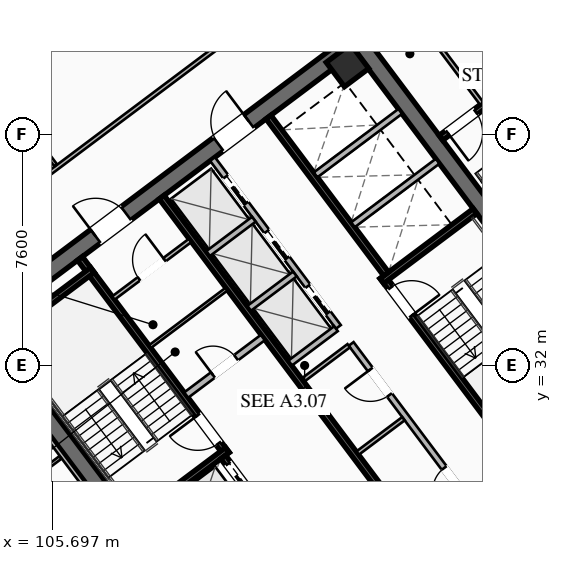
"""IFC4 building model, lengths in metres.
Left out: names, types, materials, properties, quantities, classifications, styles, units other than length and angle.
Written with IfcOpenShell. Run it as: python <this file> out.ifc"""

import sys

from ifc_helpers import new_model, si_unit, direction, frame, frame_2d, origin, origin_2d, place, context, subcontext, project, spatial, rectangle, hollow_rectangle, extrude, element, fill, save


model = new_model("IFC4")
c1 = context("Model", 3, precision=1e-05, world=origin(), true_north=direction((0.0, 1.0)))
c2 = subcontext(c1, "Body", "Model", "MODEL_VIEW")
j1 = project(units=[si_unit("LENGTHUNIT", "METRE"), si_unit("PLANEANGLEUNIT", "RADIAN")], contexts=[c1])
p1 = place(None, origin())
s1 = spatial("IfcSite", under=j1, at=p1, CompositionType="ELEMENT")
p2 = place(p1, origin())
s2 = spatial("IfcBuilding", under=s1, at=p2, CompositionType="ELEMENT")
p3 = place(p2, frame((0.0, 0.0, 128.6)))
s3 = spatial("IfcBuildingStorey", under=s2, at=p3, CompositionType="ELEMENT", Elevation=128.6)
for number, where, z_axis, x_axis in (
    (1, (112.436, 21.077, 0.0), (0.0, 0.0, 1.0), (-0.6, 0.8, 0.0)),
    (2, (115.564, 42.923, 0.0), (0.0, 0.0, 1.0), (0.6, -0.8, 0.0)),
):
    element("IfcWall", number, at=place(p3, frame(where, z_axis=z_axis, x_axis=x_axis)), inside=s3, PredefinedType="SHEAR", context=c2, shape_type="SweptSolid", body=[
        extrude(rectangle(XDim=15.6, YDim=0.55, at=frame_2d((7.8, 0.0))), origin(), (0.0, 0.0, 1.0), 3.55),
    ])
p4 = place(p3, frame((124.539, 30.498, 0.0), z_axis=(0.0, 0.0, 1.0), x_axis=(-0.799998054672, -0.600002593761, 0.0)))
e3 = element("IfcWall", 3, at=p4, inside=s3, PredefinedType="SHEAR", context=c2, shape_type="SweptSolid", body=[
    extrude(rectangle(XDim=15.06, YDim=0.55, at=frame_2d((7.53, 0.0))), origin(), (0.0, 0.0, 1.0), 3.55),
])
p5 = place(p4, frame((9.23, 0.0, 0.0)))
e4 = element("IfcOpeningElement", 4, at=p5, cuts=e3, PredefinedType="OPENING", context=c2, shape_type="SweptSolid", body=[
    extrude(rectangle(XDim=1.25, YDim=2.25, at=frame_2d((0.625, 1.125))), frame((0.0, 0.285, 0.0), z_axis=(0.0, -1.0, 0.0), x_axis=(1.0, 0.0, 0.0)), (0.0, 0.0, 1.0), 0.57),
])
p6 = place(p4, frame((4.18, 0.0, 0.0)))
e5 = element("IfcOpeningElement", 5, at=p6, cuts=e3, PredefinedType="OPENING", context=c2, shape_type="SweptSolid", body=[
    extrude(rectangle(XDim=1.25, YDim=2.25, at=frame_2d((0.625, 1.125))), frame((0.0, 0.285, 0.0), z_axis=(0.0, -1.0, 0.0), x_axis=(1.0, 0.0, 0.0)), (0.0, 0.0, 1.0), 0.57),
])
p7 = place(p3, frame((103.461, 33.502, 0.0), z_axis=(0.0, 0.0, 1.0), x_axis=(0.799998054672, 0.600002593761, 0.0)))
e6 = element("IfcWall", 6, at=p7, inside=s3, PredefinedType="SHEAR", context=c2, shape_type="SweptSolid", body=[
    extrude(rectangle(XDim=15.06, YDim=0.55, at=frame_2d((7.53, 0.0))), origin(), (0.0, 0.0, 1.0), 3.55),
])
p8 = place(p7, frame((4.58, 0.0, 0.0)))
e7 = element("IfcOpeningElement", 7, at=p8, cuts=e6, PredefinedType="OPENING", context=c2, shape_type="SweptSolid", body=[
    extrude(rectangle(XDim=1.25, YDim=2.25, at=frame_2d((0.625, 1.125))), frame((0.0, 0.285, 0.0), z_axis=(0.0, -1.0, 0.0), x_axis=(1.0, 0.0, 0.0)), (0.0, 0.0, 1.0), 0.57),
])
p9 = place(p7, frame((9.63, 0.0, 0.0)))
e8 = element("IfcOpeningElement", 8, at=p9, cuts=e6, PredefinedType="OPENING", context=c2, shape_type="SweptSolid", body=[
    extrude(rectangle(XDim=1.25, YDim=2.25, at=frame_2d((0.625, 1.125))), frame((0.0, 0.285, 0.0), z_axis=(0.0, -1.0, 0.0), x_axis=(1.0, 0.0, 0.0)), (0.0, 0.0, 1.0), 0.57),
])
p10 = place(p3, frame((115.41, 41.87, 0.0), z_axis=(0.0, 0.0, 1.0), x_axis=(0.799999996291, 0.600000004945, 0.0)))
e9 = element("IfcColumn", 9, at=p10, inside=s3, PredefinedType="COLUMN", context=c2, shape_type="SweptSolid", body=[
    extrude(hollow_rectangle(XDim=1.0, YDim=1.0, WallThickness=0.04, at=origin_2d()), origin(), (0.0, 0.0, 1.0), 3.37),
])
p11 = place(p3, frame((111.44, 29.08, 0.0), z_axis=(0.0, 0.0, 1.0), x_axis=(-0.59999029481, 0.8000072788, 0.0)))
e10 = element("IfcWall", 10, at=p11, inside=s3, PredefinedType="SHEAR", context=c2, shape_type="SweptSolid", body=[
    extrude(rectangle(XDim=8.05, YDim=0.2, at=frame_2d((4.025, 0.0))), origin(), (0.0, 0.0, 1.0), 3.37),
])
p12 = place(p11, frame((0.45, 0.0, 0.0)))
e11 = element("IfcOpeningElement", 11, at=p12, cuts=e10, PredefinedType="OPENING", context=c2, shape_type="SweptSolid", body=[
    extrude(rectangle(XDim=1.15, YDim=2.2, at=frame_2d((0.575, 1.1))), frame((0.0, 0.11, 0.0), z_axis=(0.0, -1.0, 0.0), x_axis=(1.0, 0.0, 0.0)), (0.0, 0.0, 1.0), 0.22),
])
for number, where, z_axis, x_axis in (
    (12, (108.396, 26.922, 0.0), (0.0, 0.0, 1.0), (0.8, 0.6, 0.0)),
    (13, (103.956, 32.842, 0.0), (0.0, 0.0, 1.0), (0.8, 0.6, 0.0)),
):
    element("IfcWall", number, at=place(p3, frame(where, z_axis=z_axis, x_axis=x_axis)), inside=s3, PredefinedType="SHEAR", context=c2, shape_type="SweptSolid", body=[
        extrude(rectangle(XDim=3.83, YDim=0.2, at=frame_2d((1.915, 0.0))), origin(), (0.0, 0.0, 1.0), 3.37),
    ])
p13 = place(p3, frame((116.56, 34.92, 0.0), z_axis=(0.0, 0.0, 1.0), x_axis=(0.59999029481, -0.8000072788, 0.0)))
e14 = element("IfcWall", 14, at=p13, inside=s3, PredefinedType="SHEAR", context=c2, shape_type="SweptSolid", body=[
    extrude(rectangle(XDim=8.05, YDim=0.2, at=frame_2d((4.025, 0.0))), origin(), (0.0, 0.0, 1.0), 3.37),
])
p14 = place(p13, frame((0.45, 0.0, 0.0)))
e15 = element("IfcOpeningElement", 15, at=p14, cuts=e14, PredefinedType="OPENING", context=c2, shape_type="SweptSolid", body=[
    extrude(rectangle(XDim=1.15, YDim=2.2, at=frame_2d((0.575, 1.1))), frame((0.0, 0.11, 0.0), z_axis=(0.0, -1.0, 0.0), x_axis=(1.0, 0.0, 0.0)), (0.0, 0.0, 1.0), 0.22),
])
p15 = place(p3, frame((116.54, 34.78, 0.0), z_axis=(0.0, 0.0, 1.0), x_axis=(0.800015298837, 0.599979601008, 0.0)))
e16 = element("IfcWall", 16, at=p15, inside=s3, PredefinedType="SHEAR", context=c2, shape_type="SweptSolid", body=[
    extrude(rectangle(XDim=3.83, YDim=0.2, at=frame_2d((1.915, 0.0))), origin(), (0.0, 0.0, 1.0), 3.37),
])
p16 = place(p3, frame((117.998, 25.936, 0.0), z_axis=(0.0, 0.0, 1.0), x_axis=(-0.600002693989, 0.799997979501, 0.0)))
e17 = element("IfcWall", 17, at=p16, inside=s3, PredefinedType="SHEAR", context=c2, shape_type="SweptSolid", body=[
    extrude(rectangle(XDim=14.5, YDim=0.2, at=frame_2d((7.25, 0.0))), origin(), (0.0, 0.0, 1.0), 3.37),
])
p17 = place(p3, frame((110.104, 31.028, 0.0), z_axis=(0.0, 0.0, 1.0), x_axis=(0.800018601094, 0.59997519774, 0.0)))
e18 = element("IfcWall", 18, at=p17, inside=s3, PredefinedType="SOLIDWALL", context=c2, shape_type="SweptSolid", body=[
    extrude(rectangle(XDim=3.15, YDim=0.22, at=frame_2d((1.575, 0.0))), origin(), (0.0, 0.0, 1.0), 2.723),
])
p18 = place(p17, frame((1.1, 0.0, 0.0)))
e19 = element("IfcOpeningElement", 19, at=p18, cuts=e18, PredefinedType="OPENING", context=c2, shape_type="SweptSolid", body=[
    extrude(rectangle(XDim=0.95, YDim=2.05, at=frame_2d((0.475, 1.025))), frame((0.0, 0.12, 0.0), z_axis=(0.0, -1.0, 0.0), x_axis=(1.0, 0.0, 0.0)), (0.0, 0.0, 1.0), 0.24),
])
p19 = place(p3, frame((115.19, 23.83, 0.0), z_axis=(0.0, 0.0, 1.0), x_axis=(-0.599993943644, 0.800004542231, 0.0)))
e20 = element("IfcWall", 20, at=p19, inside=s3, PredefinedType="SHEAR", context=c2, shape_type="SweptSolid", body=[
    extrude(rectangle(XDim=6.45, YDim=0.2, at=frame_2d((3.225, 0.0))), origin(), (0.0, 0.0, 1.0), 3.37),
])
p20 = place(p19, frame((4.875, 0.0, 0.0)))
e21 = element("IfcOpeningElement", 21, at=p20, cuts=e20, PredefinedType="OPENING", context=c2, shape_type="SweptSolid", body=[
    extrude(rectangle(XDim=1.3, YDim=2.25, at=frame_2d((0.65, 1.125))), frame((0.0, 0.11, 0.0), z_axis=(0.0, -1.0, 0.0), x_axis=(1.0, 0.0, 0.0)), (0.0, 0.0, 1.0), 0.22),
])
p21 = place(p19, frame((2.875, 0.0, 0.0)))
e22 = element("IfcOpeningElement", 22, at=p21, cuts=e20, PredefinedType="OPENING", context=c2, shape_type="SweptSolid", body=[
    extrude(rectangle(XDim=1.3, YDim=2.25, at=frame_2d((0.65, 1.125))), frame((0.0, 0.11, 0.0), z_axis=(0.0, -1.0, 0.0), x_axis=(1.0, 0.0, 0.0)), (0.0, 0.0, 1.0), 0.22),
])
p22 = place(p19, frame((0.675, 0.0, 0.0)))
e23 = element("IfcOpeningElement", 23, at=p22, cuts=e20, PredefinedType="OPENING", context=c2, shape_type="SweptSolid", body=[
    extrude(rectangle(XDim=1.3, YDim=2.25, at=frame_2d((0.65, 1.125))), frame((0.0, 0.11, 0.0), z_axis=(0.0, -1.0, 0.0), x_axis=(1.0, 0.0, 0.0)), (0.0, 0.0, 1.0), 0.22),
])
p23 = place(p3, frame((112.81, 40.17, 0.0), z_axis=(0.0, 0.0, 1.0), x_axis=(0.599993943644, -0.800004542231, 0.0)))
e24 = element("IfcWall", 24, at=p23, inside=s3, PredefinedType="SHEAR", context=c2, shape_type="SweptSolid", body=[
    extrude(rectangle(XDim=6.45, YDim=0.2, at=frame_2d((3.225, 0.0))), origin(), (0.0, 0.0, 1.0), 3.37),
])
for number, where, z_axis, x_axis in (
    (25, (115.59, 36.63, 0.0), (0.0, 0.0, 1.0), (0.8, 0.6, 0.0)),
    (26, (114.36, 38.27, 0.0), (0.0, 0.0, 1.0), (0.8, 0.6, 0.0)),
):
    element("IfcWall", number, at=place(p3, frame(where, z_axis=z_axis, x_axis=x_axis)), inside=s3, PredefinedType="SOLIDWALL", context=c2, shape_type="SweptSolid", body=[
        extrude(rectangle(XDim=3.48, YDim=0.2, at=frame_2d((1.74, 0.0))), origin(), (0.0, 0.0, 1.0), 3.37),
    ])
p24 = place(p3, frame((107.71, 34.22, 0.0), z_axis=(0.0, 0.0, 1.0), x_axis=(0.799981399002, 0.60002480053, 0.0)))
e27 = element("IfcWall", 27, at=p24, inside=s3, PredefinedType="PARTITIONING", context=c2, shape_type="SweptSolid", body=[
    extrude(rectangle(XDim=3.15, YDim=0.135, at=frame_2d((1.575, 0.0))), origin(), (0.0, 0.0, 1.0), 2.723),
])
p25 = place(p24, frame((1.05, 0.0, 0.0)))
e28 = element("IfcOpeningElement", 28, at=p25, cuts=e27, PredefinedType="OPENING", context=c2, shape_type="SweptSolid", body=[
    extrude(rectangle(XDim=1.05, YDim=2.2, at=frame_2d((0.525, 1.1))), frame((0.0, 0.077, 0.0), z_axis=(0.0, -1.0, 0.0), x_axis=(1.0, 0.0, 0.0)), (0.0, 0.0, 1.0), 0.155),
])
p26 = place(p3, frame((108.91, 32.62, 0.0), z_axis=(0.0, 0.0, 1.0), x_axis=(0.800018601094, 0.59997519774, 0.0)))
e29 = element("IfcWall", 29, at=p26, inside=s3, PredefinedType="PARTITIONING", context=c2, shape_type="SweptSolid", body=[
    extrude(rectangle(XDim=3.15, YDim=0.11, at=frame_2d((1.575, 0.0))), origin(), (0.0, 0.0, 1.0), 2.723),
])
p27 = place(p3, frame((119.67, 27.19, 0.0), z_axis=(0.0, 0.0, 1.0), x_axis=(-0.599988677396, 0.800008491828, 0.0)))
e30 = element("IfcWall", 30, at=p27, inside=s3, PredefinedType="SOLIDWALL", context=c2, shape_type="SweptSolid", body=[
    extrude(rectangle(XDim=6.9, YDim=0.2, at=frame_2d((3.45, 0.0))), origin(), (0.0, 0.0, 1.0), 2.723),
])
p28 = place(p27, frame((0.85, 0.0, 0.0)))
e31 = element("IfcOpeningElement", 31, at=p28, cuts=e30, PredefinedType="OPENING", context=c2, shape_type="SweptSolid", body=[
    extrude(rectangle(XDim=0.95, YDim=2.05, at=frame_2d((0.475, 1.025))), frame((0.0, 0.11, 0.0), z_axis=(0.0, -1.0, 0.0), x_axis=(1.0, 0.0, 0.0)), (0.0, 0.0, 1.0), 0.22),
])
p29 = place(p27, frame((4.8, 0.0, 0.0)))
e32 = element("IfcOpeningElement", 32, at=p29, cuts=e30, PredefinedType="OPENING", context=c2, shape_type="SweptSolid", body=[
    extrude(rectangle(XDim=1.05, YDim=2.2, at=frame_2d((0.525, 1.1))), frame((0.0, 0.11, 0.0), z_axis=(0.0, -1.0, 0.0), x_axis=(1.0, 0.0, 0.0)), (0.0, 0.0, 1.0), 0.22),
])
for number, where, z_axis, x_axis in (
    (33, (113.946, 31.522, 0.0), (0.0, 0.0, 1.0), (0.8, 0.6, 0.0)),
    (34, (115.746, 29.122, 0.0), (0.0, 0.0, 1.0), (0.8, 0.6, 0.0)),
):
    element("IfcWall", number, at=place(p3, frame(where, z_axis=z_axis, x_axis=x_axis)), inside=s3, PredefinedType="PARTITIONING", context=c2, shape_type="SweptSolid", body=[
        extrude(rectangle(XDim=1.88, YDim=0.135, at=frame_2d((0.94, 0.0))), origin(), (0.0, 0.0, 1.0), 2.723),
    ])
p30 = place(p3, frame((115.11, 33.27, 0.0), z_axis=(0.0, 0.0, 1.0), x_axis=(-0.600011322243, 0.799991508192, 0.0)))
e35 = element("IfcWall", 35, at=p30, inside=s3, PredefinedType="SOLIDWALL", context=c2, shape_type="SweptSolid", body=[
    extrude(rectangle(XDim=6.9, YDim=0.2, at=frame_2d((3.45, 0.0))), origin(), (0.0, 0.0, 1.0), 3.37),
])
p31 = place(p30, frame((0.575, 0.0, 0.0)))
e36 = element("IfcOpeningElement", 36, at=p31, cuts=e35, PredefinedType="OPENING", context=c2, shape_type="SweptSolid", body=[
    extrude(rectangle(XDim=1.1, YDim=2.2, at=frame_2d((0.55, 1.1))), frame((0.0, 0.11, 0.0), z_axis=(0.0, -1.0, 0.0), x_axis=(1.0, 0.0, 0.0)), (0.0, 0.0, 1.0), 0.22),
])
p32 = place(p30, frame((2.825, 0.0, 0.0)))
e37 = element("IfcOpeningElement", 37, at=p32, cuts=e35, PredefinedType="OPENING", context=c2, shape_type="SweptSolid", body=[
    extrude(rectangle(XDim=1.1, YDim=2.2, at=frame_2d((0.55, 1.1))), frame((0.0, 0.11, 0.0), z_axis=(0.0, -1.0, 0.0), x_axis=(1.0, 0.0, 0.0)), (0.0, 0.0, 1.0), 0.22),
])
p33 = place(p30, frame((5.075, 0.0, 0.0)))
e38 = element("IfcOpeningElement", 38, at=p33, cuts=e35, PredefinedType="OPENING", context=c2, shape_type="SweptSolid", body=[
    extrude(rectangle(XDim=1.1, YDim=2.2, at=frame_2d((0.55, 1.1))), frame((0.0, 0.11, 0.0), z_axis=(0.0, -1.0, 0.0), x_axis=(1.0, 0.0, 0.0)), (0.0, 0.0, 1.0), 0.22),
])
p34 = place(p3, frame((113.526, 32.082, 0.0), z_axis=(0.0, 0.0, 1.0), x_axis=(0.800046745961, 0.599937666993, 0.0)))
e39 = element("IfcWall", 39, at=p34, inside=s3, PredefinedType="SOLIDWALL", context=c2, shape_type="SweptSolid", body=[
    extrude(rectangle(XDim=1.88, YDim=0.2, at=frame_2d((0.94, 0.0))), origin(), (0.0, 0.0, 1.0), 3.37),
])
p35 = place(p3, frame((112.176, 33.882, 0.0), z_axis=(0.0, 0.0, 1.0), x_axis=(0.8, 0.6, 0.0)))
e40 = element("IfcWall", 40, at=p35, inside=s3, PredefinedType="SOLIDWALL", context=c2, shape_type="SweptSolid", body=[
    extrude(rectangle(XDim=1.88, YDim=0.2, at=frame_2d((0.94, 0.0))), origin(), (0.0, 0.0, 1.0), 3.37),
])
p36 = place(p3, frame((110.826, 35.682, 0.0), z_axis=(0.0, 0.0, 1.0), x_axis=(0.799984418148, 0.600020775241, 0.0)))
e41 = element("IfcWall", 41, at=p36, inside=s3, PredefinedType="SOLIDWALL", context=c2, shape_type="SweptSolid", body=[
    extrude(rectangle(XDim=1.88, YDim=0.2, at=frame_2d((0.94, 0.0))), origin(), (0.0, 0.0, 1.0), 3.37),
])
p37 = place(p3, frame((121.204, 41.528, 0.0), z_axis=(0.0, 0.0, 1.0), x_axis=(-0.800017232136, -0.599977023131, 0.0)))
e42 = element("IfcWall", 42, at=p37, inside=s3, PredefinedType="SHEAR", context=c2, shape_type="SweptSolid", body=[
    extrude(rectangle(XDim=3.4, YDim=0.2, at=frame_2d((1.7, 0.0))), origin(), (0.0, 0.0, 1.0), 3.37),
])
p38 = place(p37, frame((1.975, 0.0, 0.0)))
e43 = element("IfcOpeningElement", 43, at=p38, cuts=e42, PredefinedType="OPENING", context=c2, shape_type="SweptSolid", body=[
    extrude(rectangle(XDim=1.15, YDim=2.2, at=frame_2d((0.575, 1.1))), frame((0.0, 0.11, 0.0), z_axis=(0.0, -1.0, 0.0), x_axis=(1.0, 0.0, 0.0)), (0.0, 0.0, 1.0), 0.22),
])
p39 = place(p3, frame((119.824, 40.618, 0.0), z_axis=(0.0, 0.0, 1.0), x_axis=(-0.599982243973, 0.800013316712, 0.0)))
e44 = element("IfcWall", 44, at=p39, inside=s3, PredefinedType="PARTITIONING", context=c2, shape_type="SweptSolid", body=[
    extrude(rectangle(XDim=4.4, YDim=0.135, at=frame_2d((2.2, 0.0))), origin(), (0.0, 0.0, 1.0), 2.723),
])
p40 = place(p3, frame((95.42, 30.69, 0.0), z_axis=(0.0, 0.0, 1.0), x_axis=(0.8, 0.6, 0.0)))
e45 = element("IfcWall", 45, at=p40, inside=s3, PredefinedType="PARTITIONING", context=c2, shape_type="SweptSolid", body=[
    extrude(rectangle(XDim=31.3, YDim=0.135, at=frame_2d((15.65, 0.0))), origin(), (0.0, 0.0, 1.0), 2.723),
])
p41 = place(p40, frame((0.3, 0.0, 0.0)))
e46 = element("IfcOpeningElement", 46, at=p41, cuts=e45, PredefinedType="OPENING", context=c2, shape_type="SweptSolid", body=[
    extrude(rectangle(XDim=0.95, YDim=2.05, at=frame_2d((0.475, 1.025))), frame((0.0, 0.077, 0.0), z_axis=(0.0, -1.0, 0.0), x_axis=(1.0, 0.0, 0.0)), (0.0, 0.0, 1.0), 0.155),
])
p42 = place(p40, frame((30.05, 0.0, 0.0)))
e47 = element("IfcOpeningElement", 47, at=p42, cuts=e45, PredefinedType="OPENING", context=c2, shape_type="SweptSolid", body=[
    extrude(rectangle(XDim=0.95, YDim=2.05, at=frame_2d((0.475, 1.025))), frame((0.0, 0.077, 0.0), z_axis=(0.0, -1.0, 0.0), x_axis=(1.0, 0.0, 0.0)), (0.0, 0.0, 1.0), 0.155),
])
p43 = place(p3, frame((105.812, 38.584, 0.0), z_axis=(0.0, 0.0, 1.0), x_axis=(-0.60000964496, 0.799992766189, 0.0)))
e48 = element("IfcWall", 48, at=p43, inside=s3, PredefinedType="PARTITIONING", context=c2, shape_type="SweptSolid", body=[
    extrude(rectangle(XDim=8.1, YDim=0.11, at=frame_2d((4.05, 0.0))), origin(), (0.0, 0.0, 1.0), 2.723),
])
p44 = place(p3, frame((132.262, 33.734, 0.0), z_axis=(0.0, 0.0, 1.0), x_axis=(-0.800003744006, -0.59999500796, 0.0)))
e49 = element("IfcWall", 49, at=p44, inside=s3, PredefinedType="PARTITIONING", context=c2, shape_type="SweptSolid", body=[
    extrude(rectangle(XDim=31.3, YDim=0.135, at=frame_2d((15.65, 0.0))), origin(), (0.0, 0.0, 1.0), 2.723),
])
p45 = place(p44, frame((29.97, 0.0, 0.0)))
e50 = element("IfcOpeningElement", 50, at=p45, cuts=e49, PredefinedType="OPENING", context=c2, shape_type="SweptSolid", body=[
    extrude(rectangle(XDim=0.95, YDim=2.05, at=frame_2d((0.475, 1.025))), frame((0.0, 0.077, 0.0), z_axis=(0.0, -1.0, 0.0), x_axis=(1.0, 0.0, 0.0)), (0.0, 0.0, 1.0), 0.155),
])
p46 = place(p44, frame((15.43, 0.0, 0.0)))
e51 = element("IfcOpeningElement", 51, at=p46, cuts=e49, PredefinedType="OPENING", context=c2, shape_type="SweptSolid", body=[
    extrude(rectangle(XDim=0.95, YDim=2.05, at=frame_2d((0.475, 1.025))), frame((0.0, 0.077, 0.0), z_axis=(0.0, -1.0, 0.0), x_axis=(1.0, 0.0, 0.0)), (0.0, 0.0, 1.0), 0.155),
])
p47 = place(p44, frame((11.146, 0.0, 0.0)))
e52 = element("IfcOpeningElement", 52, at=p47, cuts=e49, PredefinedType="OPENING", context=c2, shape_type="SweptSolid", body=[
    extrude(rectangle(XDim=0.95, YDim=2.05, at=frame_2d((0.475, 1.025))), frame((0.0, 0.077, 0.0), z_axis=(0.0, -1.0, 0.0), x_axis=(1.0, 0.0, 0.0)), (0.0, 0.0, 1.0), 0.155),
])
p48 = place(p44, frame((0.38, 0.0, 0.0)))
e53 = element("IfcOpeningElement", 53, at=p48, cuts=e49, PredefinedType="OPENING", context=c2, shape_type="SweptSolid", body=[
    extrude(rectangle(XDim=0.95, YDim=2.05, at=frame_2d((0.475, 1.025))), frame((0.0, 0.077, 0.0), z_axis=(0.0, -1.0, 0.0), x_axis=(1.0, 0.0, 0.0)), (0.0, 0.0, 1.0), 0.155),
])
p49 = place(p3, frame((112.104, 20.928, 0.0), z_axis=(0.0, 0.0, 1.0), x_axis=(-0.599994940075, 0.800003794918, 0.0)))
e54 = element("IfcWall", 54, at=p49, inside=s3, PredefinedType="PARTITIONING", context=c2, shape_type="SweptSolid", body=[
    extrude(rectangle(XDim=15.44, YDim=0.135, at=frame_2d((7.72, 0.0))), origin(), (0.0, 0.0, 1.0), 2.723),
])
p50 = place(p3, frame((97.936, 22.952, 0.0), z_axis=(0.0, 0.0, 1.0), x_axis=(0.799991245945, 0.600011671896, 0.0)))
e55 = element("IfcWall", 55, at=p50, inside=s3, PredefinedType="PARTITIONING", context=c2, shape_type="SweptSolid", body=[
    extrude(rectangle(XDim=10.04, YDim=0.11, at=frame_2d((5.02, 0.0))), origin(), (0.0, 0.0, 1.0), 2.723),
])
p51 = place(p8, origin())
e56 = element("IfcDoor", 56, at=p51, inside=s3, OperationType="SINGLE_SWING_LEFT", PredefinedType="DOOR", context=c2, shape_type="SweptSolid", body=[
    extrude(rectangle(XDim=1.25, YDim=2.25, at=frame_2d((0.625, 1.125))), frame((0.0, 0.025, 0.0), z_axis=(0.0, -1.0, 0.0), x_axis=(1.0, 0.0, 0.0)), (0.0, 0.0, 1.0), 0.05),
])
fill(e7, e56)
p52 = place(p9, origin())
e57 = element("IfcDoor", 57, at=p52, inside=s3, OperationType="SINGLE_SWING_RIGHT", PredefinedType="DOOR", context=c2, shape_type="SweptSolid", body=[
    extrude(rectangle(XDim=1.25, YDim=2.25, at=frame_2d((0.625, 1.125))), frame((0.0, 0.025, 0.0), z_axis=(0.0, -1.0, 0.0), x_axis=(1.0, 0.0, 0.0)), (0.0, 0.0, 1.0), 0.05),
])
fill(e8, e57)
p53 = place(p12, origin())
e58 = element("IfcDoor", 58, at=p53, inside=s3, OperationType="SINGLE_SWING_RIGHT", PredefinedType="DOOR", context=c2, shape_type="SweptSolid", body=[
    extrude(rectangle(XDim=1.15, YDim=2.2, at=frame_2d((0.575, 1.1))), frame((0.0, 0.025, 0.0), z_axis=(0.0, -1.0, 0.0), x_axis=(1.0, 0.0, 0.0)), (0.0, 0.0, 1.0), 0.05),
])
fill(e11, e58)
p54 = place(p14, origin())
e59 = element("IfcDoor", 59, at=p54, inside=s3, OperationType="SINGLE_SWING_RIGHT", PredefinedType="DOOR", context=c2, shape_type="SweptSolid", body=[
    extrude(rectangle(XDim=1.15, YDim=2.2, at=frame_2d((0.575, 1.1))), frame((0.0, 0.025, 0.0), z_axis=(0.0, -1.0, 0.0), x_axis=(1.0, 0.0, 0.0)), (0.0, 0.0, 1.0), 0.05),
])
fill(e15, e59)
p55 = place(p25, origin())
e60 = element("IfcDoor", 60, at=p55, inside=s3, OperationType="SINGLE_SWING_RIGHT", PredefinedType="DOOR", context=c2, shape_type="SweptSolid", body=[
    extrude(rectangle(XDim=1.05, YDim=2.2, at=frame_2d((0.525, 1.1))), frame((0.0, 0.025, 0.0), z_axis=(0.0, -1.0, 0.0), x_axis=(1.0, 0.0, 0.0)), (0.0, 0.0, 1.0), 0.05),
])
fill(e28, e60)
p56 = place(p18, origin())
e61 = element("IfcDoor", 61, at=p56, inside=s3, OperationType="SINGLE_SWING_LEFT", PredefinedType="DOOR", context=c2, shape_type="SweptSolid", body=[
    extrude(rectangle(XDim=0.95, YDim=2.05, at=frame_2d((0.475, 1.025))), frame((0.0, 0.025, 0.0), z_axis=(0.0, -1.0, 0.0), x_axis=(1.0, 0.0, 0.0)), (0.0, 0.0, 1.0), 0.05),
])
fill(e19, e61)
p57 = place(p28, origin())
e62 = element("IfcDoor", 62, at=p57, inside=s3, OperationType="SINGLE_SWING_LEFT", PredefinedType="DOOR", context=c2, shape_type="SweptSolid", body=[
    extrude(rectangle(XDim=0.95, YDim=2.05, at=frame_2d((0.475, 1.025))), frame((0.0, 0.025, 0.0), z_axis=(0.0, -1.0, 0.0), x_axis=(1.0, 0.0, 0.0)), (0.0, 0.0, 1.0), 0.05),
])
fill(e31, e62)
p58 = place(p29, origin())
e63 = element("IfcDoor", 63, at=p58, inside=s3, OperationType="SINGLE_SWING_RIGHT", PredefinedType="DOOR", context=c2, shape_type="SweptSolid", body=[
    extrude(rectangle(XDim=1.05, YDim=2.2, at=frame_2d((0.525, 1.1))), frame((0.0, 0.025, 0.0), z_axis=(0.0, -1.0, 0.0), x_axis=(1.0, 0.0, 0.0)), (0.0, 0.0, 1.0), 0.05),
])
fill(e32, e63)
p59 = place(p38, origin())
e64 = element("IfcDoor", 64, at=p59, inside=s3, OperationType="SINGLE_SWING_RIGHT", PredefinedType="DOOR", context=c2, shape_type="SweptSolid", body=[
    extrude(rectangle(XDim=1.15, YDim=2.2, at=frame_2d((0.575, 1.1))), frame((0.0, 0.025, 0.0), z_axis=(0.0, -1.0, 0.0), x_axis=(1.0, 0.0, 0.0)), (0.0, 0.0, 1.0), 0.05),
])
fill(e43, e64)
p60 = place(p20, origin())
e65 = element("IfcDoor", 65, at=p60, inside=s3, OperationType="SLIDING_TO_LEFT", PredefinedType="DOOR", context=c2, shape_type="SweptSolid", body=[
    extrude(rectangle(XDim=1.3, YDim=2.25, at=frame_2d((0.65, 1.125))), frame((0.0, 0.025, 0.0), z_axis=(0.0, -1.0, 0.0), x_axis=(1.0, 0.0, 0.0)), (0.0, 0.0, 1.0), 0.05),
])
fill(e21, e65)
p61 = place(p31, origin())
e66 = element("IfcDoor", 66, at=p61, inside=s3, OperationType="SLIDING_TO_LEFT", PredefinedType="DOOR", context=c2, shape_type="SweptSolid", body=[
    extrude(rectangle(XDim=1.1, YDim=2.2, at=frame_2d((0.55, 1.1))), frame((0.0, 0.025, 0.0), z_axis=(0.0, -1.0, 0.0), x_axis=(1.0, 0.0, 0.0)), (0.0, 0.0, 1.0), 0.05),
])
fill(e36, e66)
p62 = place(p32, origin())
e67 = element("IfcDoor", 67, at=p62, inside=s3, OperationType="SLIDING_TO_LEFT", PredefinedType="DOOR", context=c2, shape_type="SweptSolid", body=[
    extrude(rectangle(XDim=1.1, YDim=2.2, at=frame_2d((0.55, 1.1))), frame((0.0, 0.025, 0.0), z_axis=(0.0, -1.0, 0.0), x_axis=(1.0, 0.0, 0.0)), (0.0, 0.0, 1.0), 0.05),
])
fill(e37, e67)
p63 = place(p33, origin())
e68 = element("IfcDoor", 68, at=p63, inside=s3, OperationType="SLIDING_TO_LEFT", PredefinedType="DOOR", context=c2, shape_type="SweptSolid", body=[
    extrude(rectangle(XDim=1.1, YDim=2.2, at=frame_2d((0.55, 1.1))), frame((0.0, 0.025, 0.0), z_axis=(0.0, -1.0, 0.0), x_axis=(1.0, 0.0, 0.0)), (0.0, 0.0, 1.0), 0.05),
])
fill(e38, e68)
save(model, sys.argv[1])
